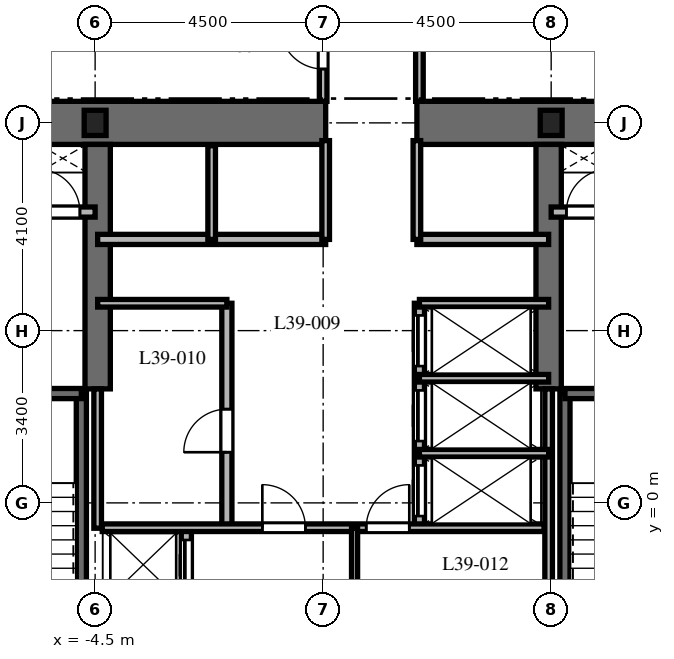
"""IFC4 building model, lengths in metres.
Left out: names, types, materials, properties, quantities, classifications, styles, units other than length and angle.
Written with IfcOpenShell. Run it as: python <this file> out.ifc"""

import sys

from ifc_helpers import new_model, si_unit, direction, frame, frame_2d, origin, origin_2d, place, context, subcontext, project, spatial, rectangle, i_section, extrude, element, fill, save


model = new_model("IFC4")
c1 = context("Model", 3, precision=1e-05, world=origin(), true_north=direction((0.0, 1.0)))
c2 = subcontext(c1, "Body", "Model", "MODEL_VIEW")
j1 = project(units=[si_unit("LENGTHUNIT", "METRE"), si_unit("PLANEANGLEUNIT", "RADIAN")], contexts=[c1])
p1 = place(None, origin())
s1 = spatial("IfcSite", under=j1, at=p1, CompositionType="ELEMENT")
p2 = place(p1, origin())
s2 = spatial("IfcBuilding", under=s1, at=p2, CompositionType="ELEMENT")
p3 = place(p2, frame((0.0, 0.0, 159.1)))
s3 = spatial("IfcBuildingStorey", under=s2, at=p3, CompositionType="ELEMENT", Elevation=159.1)
p4 = place(p3, frame((-9.425, 7.5, 0.0), z_axis=(0.0, 0.0, 1.0), x_axis=(1.0, 0.0, 0.0)))
e1 = element("IfcWall", 1, at=p4, inside=s3, PredefinedType="SHEAR", context=c2, shape_type="SweptSolid", body=[
    extrude(rectangle(XDim=9.475, YDim=0.85, at=frame_2d((4.738, 0.0))), origin(), (0.0, 0.0, 1.0), 3.7),
])
p5 = place(p3, frame((1.85, 7.5, 0.0), z_axis=(0.0, 0.0, 1.0), x_axis=(1.0, 0.0, 0.0)))
e2 = element("IfcWall", 2, at=p5, inside=s3, PredefinedType="SHEAR", context=c2, shape_type="SweptSolid", body=[
    extrude(rectangle(XDim=7.575, YDim=0.85, at=frame_2d((3.788, 0.0))), origin(), (0.0, 0.0, 1.0), 3.7),
])
for number, where, z_axis, x_axis in (
    (3, (-4.45, 2.25, 0.0), (0.0, 0.0, 1.0), (0.0, 1.0, 0.0)),
    (4, (4.45, 2.25, 0.0), (0.0, 0.0, 1.0), (0.0, 1.0, 0.0)),
):
    element("IfcWall", number, at=place(p3, frame(where, z_axis=z_axis, x_axis=x_axis)), inside=s3, PredefinedType="SHEAR", context=c2, shape_type="SweptSolid", body=[
        extrude(rectangle(XDim=4.825, YDim=0.5, at=frame_2d((2.413, 0.0))), origin(), (0.0, 0.0, 1.0), 3.7),
    ])
p6 = place(p3, frame((-4.772, -6.985, 0.0), z_axis=(0.0, 0.0, 1.0), x_axis=(0.0, 1.0, 0.0)))
e5 = element("IfcWall", 5, at=p6, inside=s3, PredefinedType="SHEAR", context=c2, shape_type="SweptSolid", body=[
    extrude(rectangle(XDim=9.143, YDim=0.2, at=frame_2d((4.572, 0.0))), origin(), (0.0, 0.0, 1.0), 3.7),
])
p7 = place(p3, frame((-8.458, 2.158, 0.0), z_axis=(0.0, 0.0, 1.0), x_axis=(1.0, 0.0, 0.0)))
e6 = element("IfcWall", 6, at=p7, inside=s3, PredefinedType="SHEAR", context=c2, shape_type="SweptSolid", body=[
    extrude(rectangle(XDim=3.686, YDim=0.2, at=frame_2d((1.843, 0.0))), origin(), (0.0, 0.0, 1.0), 3.7),
])
p8 = place(p7, frame((1.3, 0.0, 0.0)))
e7 = element("IfcOpeningElement", 7, at=p8, cuts=e6, PredefinedType="OPENING", context=c2, shape_type="SweptSolid", body=[
    extrude(rectangle(XDim=1.0, YDim=2.15, at=frame_2d((0.5, 1.075))), frame((0.0, 0.11, 0.0), z_axis=(0.0, -1.0, 0.0), x_axis=(1.0, 0.0, 0.0)), (0.0, 0.0, 1.0), 0.22),
])
p9 = place(p3, frame((4.772, -6.985, 0.0), z_axis=(0.0, 0.0, 1.0), x_axis=(0.0, 1.0, 0.0)))
e8 = element("IfcWall", 8, at=p9, inside=s3, PredefinedType="SHEAR", context=c2, shape_type="SweptSolid", body=[
    extrude(rectangle(XDim=9.143, YDim=0.2, at=frame_2d((4.572, 0.0))), origin(), (0.0, 0.0, 1.0), 3.7),
])
p10 = place(p3, frame((4.772, 2.158, 0.0), z_axis=(0.0, 0.0, 1.0), x_axis=(1.0, 0.0, 0.0)))
e9 = element("IfcWall", 9, at=p10, inside=s3, PredefinedType="SHEAR", context=c2, shape_type="SweptSolid", body=[
    extrude(rectangle(XDim=3.686, YDim=0.2, at=frame_2d((1.843, 0.0))), origin(), (0.0, 0.0, 1.0), 3.7),
])
p11 = place(p10, frame((1.35, 0.0, 0.0)))
e10 = element("IfcOpeningElement", 10, at=p11, cuts=e9, PredefinedType="OPENING", context=c2, shape_type="SweptSolid", body=[
    extrude(rectangle(XDim=1.0, YDim=2.15, at=frame_2d((0.5, 1.075))), frame((0.0, 0.11, 0.0), z_axis=(0.0, -1.0, 0.0), x_axis=(1.0, 0.0, 0.0)), (0.0, 0.0, 1.0), 0.22),
])
for number, where, z_axis, x_axis in (
    (11, (4.5, 7.5, 0.0), (0.0, 0.0, 1.0), (1.0, 0.0, 0.0)),
    (12, (-4.5, 7.5, 0.0), (0.0, 0.0, 1.0), (1.0, 0.0, 0.0)),
):
    element("IfcColumn", number, at=place(p3, frame(where, z_axis=z_axis, x_axis=x_axis)), inside=s3, PredefinedType="COLUMN", context=c2, shape_type="SweptSolid", body=[
        extrude(i_section(OverallWidth=0.432, OverallDepth=0.498, WebThickness=0.056, FlangeThickness=0.089, at=origin_2d()), origin(), (0.0, 0.0, 1.0), 3.7),
    ])
p12 = place(p3, frame((-8.55, 5.74, 0.0), z_axis=(0.0, 0.0, 1.0), x_axis=(1.0, 0.0, 0.0)))
e13 = element("IfcWall", 13, at=p12, inside=s3, PredefinedType="PARTITIONING", context=c2, shape_type="SweptSolid", body=[
    extrude(rectangle(XDim=4.05, YDim=0.2, at=frame_2d((2.025, 0.0))), origin(), (0.0, 0.0, 1.0), 3.4),
])
p13 = place(p12, frame((0.75, 0.0, 0.0)))
e14 = element("IfcOpeningElement", 14, at=p13, cuts=e13, PredefinedType="OPENING", context=c2, shape_type="SweptSolid", body=[
    extrude(rectangle(XDim=1.1, YDim=2.2, at=frame_2d((0.55, 1.1))), frame((0.0, 0.11, 0.0), z_axis=(0.0, -1.0, 0.0), x_axis=(1.0, 0.0, 0.0)), (0.0, 0.0, 1.0), 0.22),
])
p14 = place(p12, frame((2.9, 0.0, 0.0)))
e15 = element("IfcOpeningElement", 15, at=p14, cuts=e13, PredefinedType="OPENING", context=c2, shape_type="SweptSolid", body=[
    extrude(rectangle(XDim=0.85, YDim=2.03, at=frame_2d((0.425, 1.015))), frame((0.0, 0.11, 0.0), z_axis=(0.0, -1.0, 0.0), x_axis=(1.0, 0.0, 0.0)), (0.0, 0.0, 1.0), 0.22),
])
p15 = place(p3, frame((4.5, 5.74, 0.0), z_axis=(0.0, 0.0, 1.0), x_axis=(1.0, 0.0, 0.0)))
e16 = element("IfcWall", 16, at=p15, inside=s3, PredefinedType="PARTITIONING", context=c2, shape_type="SweptSolid", body=[
    extrude(rectangle(XDim=4.05, YDim=0.2, at=frame_2d((2.025, 0.0))), origin(), (0.0, 0.0, 1.0), 3.4),
])
p16 = place(p15, frame((0.3, 0.0, 0.0)))
e17 = element("IfcOpeningElement", 17, at=p16, cuts=e16, PredefinedType="OPENING", context=c2, shape_type="SweptSolid", body=[
    extrude(rectangle(XDim=0.85, YDim=2.03, at=frame_2d((0.425, 1.015))), frame((0.0, 0.11, 0.0), z_axis=(0.0, -1.0, 0.0), x_axis=(1.0, 0.0, 0.0)), (0.0, 0.0, 1.0), 0.22),
])
p17 = place(p15, frame((2.15, 0.0, 0.0)))
e18 = element("IfcOpeningElement", 18, at=p17, cuts=e16, PredefinedType="OPENING", context=c2, shape_type="SweptSolid", body=[
    extrude(rectangle(XDim=1.1, YDim=2.2, at=frame_2d((0.55, 1.1))), frame((0.0, 0.11, 0.0), z_axis=(0.0, -1.0, 0.0), x_axis=(1.0, 0.0, 0.0)), (0.0, 0.0, 1.0), 0.22),
])
p18 = place(p3, frame((-2.7, -1.972, 0.0), z_axis=(0.0, 0.0, 1.0), x_axis=(0.0, 1.0, 0.0)))
e19 = element("IfcWall", 19, at=p18, inside=s3, PredefinedType="PARTITIONING", context=c2, shape_type="SweptSolid", body=[
    extrude(rectangle(XDim=1.472, YDim=0.2, at=frame_2d((0.736, 0.0))), origin(), (0.0, 0.0, 1.0), 3.4),
])
p19 = place(p18, frame((0.24, 0.0, 0.0)))
e20 = element("IfcOpeningElement", 20, at=p19, cuts=e19, PredefinedType="OPENING", context=c2, shape_type="SweptSolid", body=[
    extrude(rectangle(XDim=1.0, YDim=2.2, at=frame_2d((0.5, 1.1))), frame((0.0, 0.11, 0.0), z_axis=(0.0, -1.0, 0.0), x_axis=(1.0, 0.0, 0.0)), (0.0, 0.0, 1.0), 0.22),
])
p20 = place(p3, frame((-4.45, 5.2, 0.0), z_axis=(0.0, 0.0, 1.0), x_axis=(1.0, 0.0, 0.0)))
e21 = element("IfcWall", 21, at=p20, inside=s3, PredefinedType="PARTITIONING", context=c2, shape_type="SweptSolid", body=[
    extrude(rectangle(XDim=4.5, YDim=0.2, at=frame_2d((2.25, 0.0))), origin(), (0.0, 0.0, 1.0), 3.4),
])
p21 = place(p3, frame((1.85, 5.2, 0.0), z_axis=(0.0, 0.0, 1.0), x_axis=(1.0, 0.0, 0.0)))
e22 = element("IfcWall", 22, at=p21, inside=s3, PredefinedType="PARTITIONING", context=c2, shape_type="SweptSolid", body=[
    extrude(rectangle(XDim=2.6, YDim=0.2, at=frame_2d((1.3, 0.0))), origin(), (0.0, 0.0, 1.0), 3.4),
])
p22 = place(p3, frame((-2.2, 5.2, 0.0), z_axis=(0.0, 0.0, 1.0), x_axis=(0.0, 1.0, 0.0)))
e23 = element("IfcWall", 23, at=p22, inside=s3, PredefinedType="PARTITIONING", context=c2, shape_type="SweptSolid", body=[
    extrude(rectangle(XDim=1.85, YDim=0.15, at=frame_2d((0.925, 0.0))), origin(), (0.0, 0.0, 1.0), 3.4),
])
for number, where, z_axis, x_axis in (
    (24, (0.05, 5.2, 0.0), (0.0, 0.0, 1.0), (0.0, 1.0, 0.0)),
    (25, (1.85, 5.2, 0.0), (0.0, 0.0, 1.0), (0.0, 1.0, 0.0)),
):
    element("IfcWall", number, at=place(p3, frame(where, z_axis=z_axis, x_axis=x_axis)), inside=s3, PredefinedType="PARTITIONING", context=c2, shape_type="SweptSolid", body=[
        extrude(rectangle(XDim=1.95, YDim=0.15, at=frame_2d((0.975, 0.0))), origin(), (0.0, 0.0, 1.0), 3.4),
    ])
p23 = place(p3, frame((-4.45, -0.5, 0.0), z_axis=(0.0, 0.0, 1.0), x_axis=(0.0, 1.0, 0.0)))
e26 = element("IfcWall", 26, at=p23, inside=s3, PredefinedType="PARTITIONING", context=c2, shape_type="SweptSolid", body=[
    extrude(rectangle(XDim=2.75, YDim=0.15, at=frame_2d((1.375, 0.0))), origin(), (0.0, 0.0, 1.0), 3.4),
])
p24 = place(p3, frame((4.45, -1.972, 0.0), z_axis=(0.0, 0.0, 1.0), x_axis=(0.0, 1.0, 0.0)))
e27 = element("IfcWall", 27, at=p24, inside=s3, PredefinedType="PARTITIONING", context=c2, shape_type="SweptSolid", body=[
    extrude(rectangle(XDim=4.222, YDim=0.15, at=frame_2d((2.111, 0.0))), origin(), (0.0, 0.0, 1.0), 3.4),
])
p25 = place(p3, frame((-1.9, -0.5, 0.0), z_axis=(0.0, 0.0, 1.0), x_axis=(0.0, 1.0, 0.0)))
e28 = element("IfcWall", 28, at=p25, inside=s3, PredefinedType="PARTITIONING", context=c2, shape_type="SweptSolid", body=[
    extrude(rectangle(XDim=4.44, YDim=0.2, at=frame_2d((2.22, 0.0))), origin(), (0.0, 0.0, 1.0), 3.4),
])
p26 = place(p25, frame((1.5, 0.0, 0.0)))
e29 = element("IfcOpeningElement", 29, at=p26, cuts=e28, PredefinedType="OPENING", context=c2, shape_type="SweptSolid", body=[
    extrude(rectangle(XDim=0.85, YDim=2.03, at=frame_2d((0.425, 1.015))), frame((0.0, 0.11, 0.0), z_axis=(0.0, -1.0, 0.0), x_axis=(1.0, 0.0, 0.0)), (0.0, 0.0, 1.0), 0.22),
])
p27 = place(p3, frame((-4.45, 3.94, 0.0), z_axis=(0.0, 0.0, 1.0), x_axis=(1.0, 0.0, 0.0)))
e30 = element("IfcWall", 30, at=p27, inside=s3, PredefinedType="PARTITIONING", context=c2, shape_type="SweptSolid", body=[
    extrude(rectangle(XDim=2.55, YDim=0.15, at=frame_2d((1.275, 0.0))), origin(), (0.0, 0.0, 1.0), 3.4),
])
p28 = place(p3, frame((1.9, -0.5, 0.0), z_axis=(0.0, 0.0, 1.0), x_axis=(0.0, 1.0, 0.0)))
e31 = element("IfcWall", 31, at=p28, inside=s3, PredefinedType="PARTITIONING", context=c2, shape_type="SweptSolid", body=[
    extrude(rectangle(XDim=4.44, YDim=0.2, at=frame_2d((2.22, 0.0))), origin(), (0.0, 0.0, 1.0), 3.4),
])
p29 = place(p28, frame((0.24, 0.0, 0.0)))
e32 = element("IfcOpeningElement", 32, at=p29, cuts=e31, PredefinedType="OPENING", context=c2, shape_type="SweptSolid", body=[
    extrude(rectangle(XDim=1.0, YDim=2.2, at=frame_2d((0.5, 1.1))), frame((0.0, 0.11, 0.0), z_axis=(0.0, -1.0, 0.0), x_axis=(1.0, 0.0, 0.0)), (0.0, 0.0, 1.0), 0.22),
])
p30 = place(p28, frame((1.72, 0.0, 0.0)))
e33 = element("IfcOpeningElement", 33, at=p30, cuts=e31, PredefinedType="OPENING", context=c2, shape_type="SweptSolid", body=[
    extrude(rectangle(XDim=1.0, YDim=2.2, at=frame_2d((0.5, 1.1))), frame((0.0, 0.11, 0.0), z_axis=(0.0, -1.0, 0.0), x_axis=(1.0, 0.0, 0.0)), (0.0, 0.0, 1.0), 0.22),
])
p31 = place(p28, frame((3.2, 0.0, 0.0)))
e34 = element("IfcOpeningElement", 34, at=p31, cuts=e31, PredefinedType="OPENING", context=c2, shape_type="SweptSolid", body=[
    extrude(rectangle(XDim=1.0, YDim=2.2, at=frame_2d((0.5, 1.1))), frame((0.0, 0.11, 0.0), z_axis=(0.0, -1.0, 0.0), x_axis=(1.0, 0.0, 0.0)), (0.0, 0.0, 1.0), 0.22),
])
for number, where, z_axis, x_axis in (
    (35, (1.9, 3.94, 0.0), (0.0, 0.0, 1.0), (1.0, 0.0, 0.0)),
    (36, (1.9, 0.98, 0.0), (0.0, 0.0, 1.0), (1.0, 0.0, 0.0)),
    (37, (1.9, 2.46, 0.0), (0.0, 0.0, 1.0), (1.0, 0.0, 0.0)),
):
    element("IfcWall", number, at=place(p3, frame(where, z_axis=z_axis, x_axis=x_axis)), inside=s3, PredefinedType="PARTITIONING", context=c2, shape_type="SweptSolid", body=[
        extrude(rectangle(XDim=2.55, YDim=0.15, at=frame_2d((1.275, 0.0))), origin(), (0.0, 0.0, 1.0), 3.4),
    ])
p32 = place(p3, frame((-4.36, -0.49, 0.0), z_axis=(0.0, 0.0, 1.0), x_axis=(1.0, 0.0, 0.0)))
e38 = element("IfcWall", 38, at=p32, inside=s3, PredefinedType="PARTITIONING", context=c2, shape_type="SweptSolid", body=[
    extrude(rectangle(XDim=8.72, YDim=0.15, at=frame_2d((4.36, 0.0))), origin(), (0.0, 0.0, 1.0), 3.4),
])
p33 = place(p32, frame((3.16, 0.0, 0.0)))
e39 = element("IfcOpeningElement", 39, at=p33, cuts=e38, PredefinedType="OPENING", context=c2, shape_type="SweptSolid", body=[
    extrude(rectangle(XDim=0.85, YDim=2.03, at=frame_2d((0.425, 1.015))), frame((0.0, 0.085, 0.0), z_axis=(0.0, -1.0, 0.0), x_axis=(1.0, 0.0, 0.0)), (0.0, 0.0, 1.0), 0.17),
])
p34 = place(p32, frame((5.21, 0.0, 0.0)))
e40 = element("IfcOpeningElement", 40, at=p34, cuts=e38, PredefinedType="OPENING", context=c2, shape_type="SweptSolid", body=[
    extrude(rectangle(XDim=0.85, YDim=2.03, at=frame_2d((0.425, 1.015))), frame((0.0, 0.085, 0.0), z_axis=(0.0, -1.0, 0.0), x_axis=(1.0, 0.0, 0.0)), (0.0, 0.0, 1.0), 0.17),
])
p35 = place(p3, frame((0.62, -1.972, 0.0), z_axis=(0.0, 0.0, 1.0), x_axis=(0.0, 1.0, 0.0)))
e41 = element("IfcWall", 41, at=p35, inside=s3, PredefinedType="PARTITIONING", context=c2, shape_type="SweptSolid", body=[
    extrude(rectangle(XDim=1.472, YDim=0.12, at=frame_2d((0.736, 0.0))), origin(), (0.0, 0.0, 1.0), 3.4),
])
p36 = place(p3, frame((1.9, 10.05, 0.0), z_axis=(0.0, 0.0, 1.0), x_axis=(0.0, -1.0, 0.0)))
e42 = element("IfcWall", 42, at=p36, inside=s3, PredefinedType="PARTITIONING", context=c2, shape_type="SweptSolid", body=[
    extrude(rectangle(XDim=2.125, YDim=0.15, at=frame_2d((1.062, 0.0))), origin(), (0.0, 0.0, 1.0), 3.4),
])
p37 = place(p3, frame((0.0, 7.925, 0.0), z_axis=(0.0, 0.0, 1.0), x_axis=(0.0, 1.0, 0.0)))
e43 = element("IfcWall", 43, at=p37, inside=s3, PredefinedType="PARTITIONING", context=c2, shape_type="SweptSolid", body=[
    extrude(rectangle(XDim=2.125, YDim=0.15, at=frame_2d((1.062, 0.0))), origin(), (0.0, 0.0, 1.0), 3.4),
])
p38 = place(p37, frame((0.638, 0.0, 0.0)))
e44 = element("IfcOpeningElement", 44, at=p38, cuts=e43, PredefinedType="OPENING", context=c2, shape_type="SweptSolid", body=[
    extrude(rectangle(XDim=0.85, YDim=2.03, at=frame_2d((0.425, 1.015))), frame((0.0, 0.085, 0.0), z_axis=(0.0, -1.0, 0.0), x_axis=(1.0, 0.0, 0.0)), (0.0, 0.0, 1.0), 0.17),
])
p39 = place(p14, origin())
e45 = element("IfcDoor", 45, at=p39, inside=s3, OperationType="SINGLE_SWING_LEFT", PredefinedType="DOOR", context=c2, shape_type="SweptSolid", body=[
    extrude(rectangle(XDim=0.85, YDim=2.03, at=frame_2d((0.425, 1.015))), frame((0.0, 0.025, 0.0), z_axis=(0.0, -1.0, 0.0), x_axis=(1.0, 0.0, 0.0)), (0.0, 0.0, 1.0), 0.05),
])
fill(e15, e45)
p40 = place(p16, origin())
e46 = element("IfcDoor", 46, at=p40, inside=s3, OperationType="SINGLE_SWING_RIGHT", PredefinedType="DOOR", context=c2, shape_type="SweptSolid", body=[
    extrude(rectangle(XDim=0.85, YDim=2.03, at=frame_2d((0.425, 1.015))), frame((0.0, 0.025, 0.0), z_axis=(0.0, -1.0, 0.0), x_axis=(1.0, 0.0, 0.0)), (0.0, 0.0, 1.0), 0.05),
])
fill(e17, e46)
p41 = place(p19, origin())
e47 = element("IfcDoor", 47, at=p41, inside=s3, OperationType="SLIDING_TO_LEFT", PredefinedType="DOOR", context=c2, shape_type="SweptSolid", body=[
    extrude(rectangle(XDim=1.0, YDim=2.2, at=frame_2d((0.5, 1.1))), frame((0.0, 0.025, 0.0), z_axis=(0.0, -1.0, 0.0), x_axis=(1.0, 0.0, 0.0)), (0.0, 0.0, 1.0), 0.05),
])
fill(e20, e47)
p42 = place(p26, origin())
e48 = element("IfcDoor", 48, at=p42, inside=s3, OperationType="SINGLE_SWING_LEFT", PredefinedType="DOOR", context=c2, shape_type="SweptSolid", body=[
    extrude(rectangle(XDim=0.85, YDim=2.03, at=frame_2d((0.425, 1.015))), frame((0.0, 0.025, 0.0), z_axis=(0.0, -1.0, 0.0), x_axis=(1.0, 0.0, 0.0)), (0.0, 0.0, 1.0), 0.05),
])
fill(e29, e48)
p43 = place(p29, origin())
e49 = element("IfcDoor", 49, at=p43, inside=s3, OperationType="SLIDING_TO_RIGHT", PredefinedType="DOOR", context=c2, shape_type="SweptSolid", body=[
    extrude(rectangle(XDim=1.0, YDim=2.2, at=frame_2d((0.5, 1.1))), frame((0.0, 0.025, 0.0), z_axis=(0.0, -1.0, 0.0), x_axis=(1.0, 0.0, 0.0)), (0.0, 0.0, 1.0), 0.05),
])
fill(e32, e49)
p44 = place(p30, origin())
e50 = element("IfcDoor", 50, at=p44, inside=s3, OperationType="SLIDING_TO_RIGHT", PredefinedType="DOOR", context=c2, shape_type="SweptSolid", body=[
    extrude(rectangle(XDim=1.0, YDim=2.2, at=frame_2d((0.5, 1.1))), frame((0.0, 0.025, 0.0), z_axis=(0.0, -1.0, 0.0), x_axis=(1.0, 0.0, 0.0)), (0.0, 0.0, 1.0), 0.05),
])
fill(e33, e50)
p45 = place(p31, origin())
e51 = element("IfcDoor", 51, at=p45, inside=s3, OperationType="SLIDING_TO_RIGHT", PredefinedType="DOOR", context=c2, shape_type="SweptSolid", body=[
    extrude(rectangle(XDim=1.0, YDim=2.2, at=frame_2d((0.5, 1.1))), frame((0.0, 0.025, 0.0), z_axis=(0.0, -1.0, 0.0), x_axis=(1.0, 0.0, 0.0)), (0.0, 0.0, 1.0), 0.05),
])
fill(e34, e51)
p46 = place(p33, origin())
e52 = element("IfcDoor", 52, at=p46, inside=s3, OperationType="SINGLE_SWING_LEFT", PredefinedType="DOOR", context=c2, shape_type="SweptSolid", body=[
    extrude(rectangle(XDim=0.85, YDim=2.03, at=frame_2d((0.425, 1.015))), frame((0.0, 0.025, 0.0), z_axis=(0.0, -1.0, 0.0), x_axis=(1.0, 0.0, 0.0)), (0.0, 0.0, 1.0), 0.05),
])
fill(e39, e52)
p47 = place(p34, origin())
e53 = element("IfcDoor", 53, at=p47, inside=s3, OperationType="SINGLE_SWING_RIGHT", PredefinedType="DOOR", context=c2, shape_type="SweptSolid", body=[
    extrude(rectangle(XDim=0.85, YDim=2.03, at=frame_2d((0.425, 1.015))), frame((0.0, 0.025, 0.0), z_axis=(0.0, -1.0, 0.0), x_axis=(1.0, 0.0, 0.0)), (0.0, 0.0, 1.0), 0.05),
])
fill(e40, e53)
p48 = place(p38, origin())
e54 = element("IfcDoor", 54, at=p48, inside=s3, OperationType="SINGLE_SWING_RIGHT", PredefinedType="DOOR", context=c2, shape_type="SweptSolid", body=[
    extrude(rectangle(XDim=0.85, YDim=2.03, at=frame_2d((0.425, 1.015))), frame((0.0, 0.025, 0.0), z_axis=(0.0, -1.0, 0.0), x_axis=(1.0, 0.0, 0.0)), (0.0, 0.0, 1.0), 0.05),
])
fill(e44, e54)
save(model, sys.argv[1])
